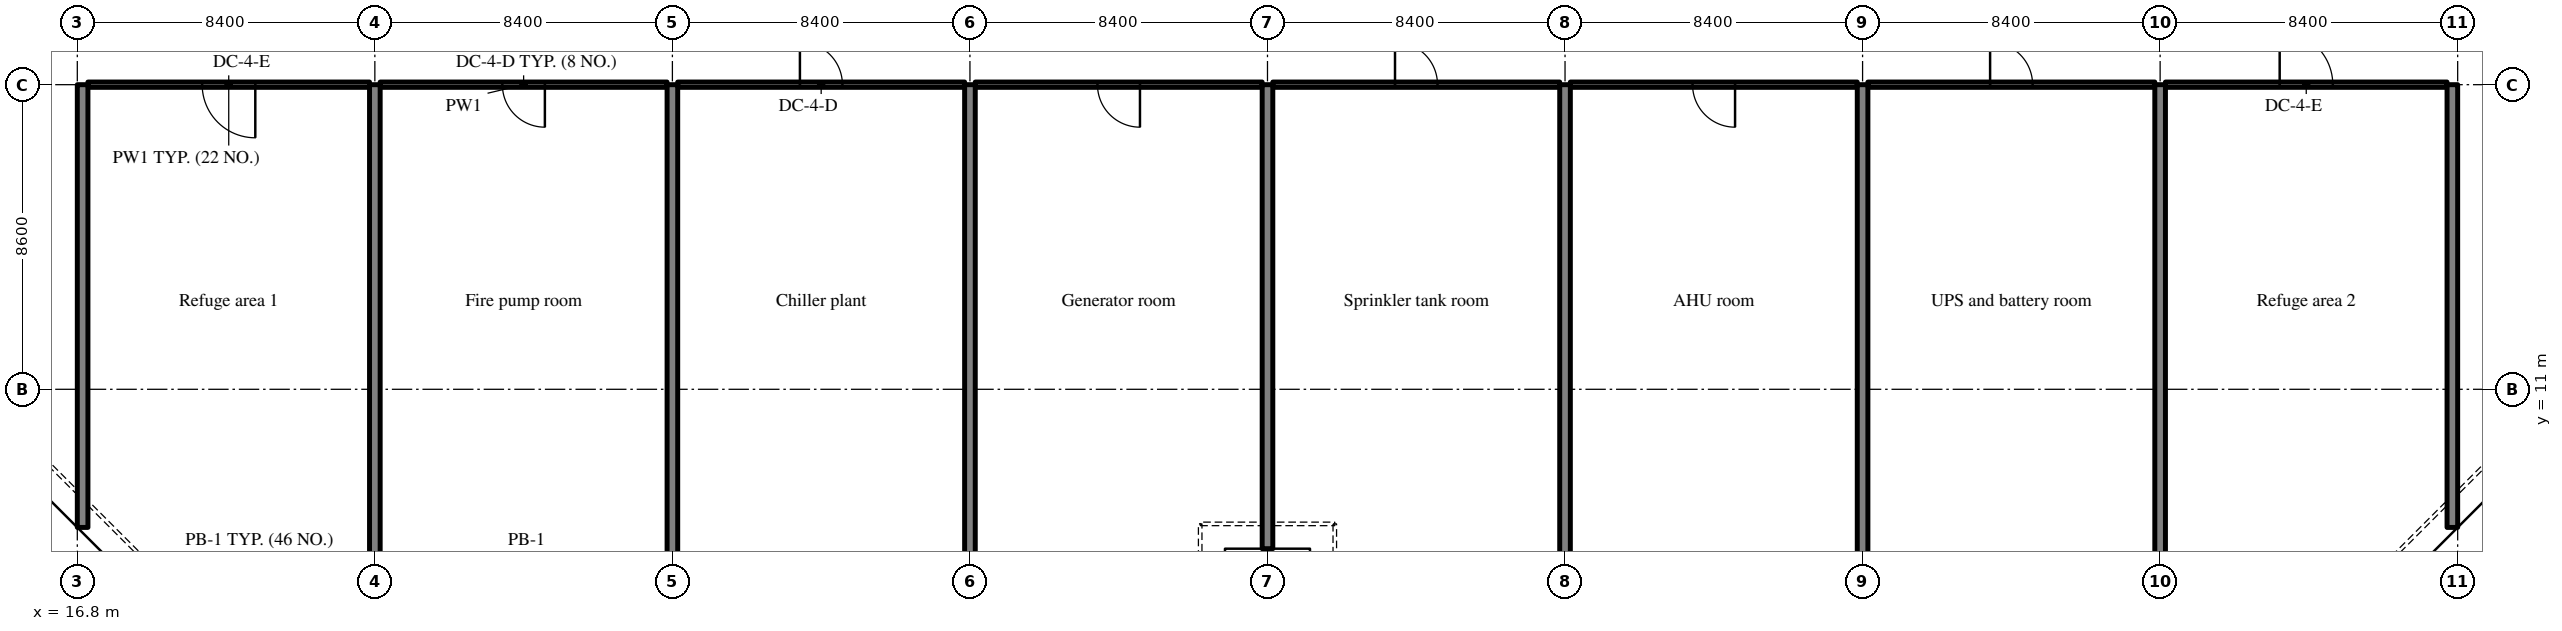
"""IFC4 building model, lengths in metres.
Left out: names, types, materials, properties, quantities, classifications, styles, units other than length and angle.
Written with IfcOpenShell. Run it as: python <this file> out.ifc"""

import sys

from ifc_helpers import new_model, si_unit, direction, frame, frame_2d, origin, place, context, subcontext, project, spatial, rectangle, extrude, source, transform, mapped, element, fill, save


model = new_model("IFC4")
c1 = context("Model", 3, precision=1e-05, world=origin(), true_north=direction((0.0, 1.0)))
c2 = subcontext(c1, "Body", "Model", "MODEL_VIEW")
j1 = project(units=[si_unit("LENGTHUNIT", "METRE"), si_unit("PLANEANGLEUNIT", "RADIAN")], contexts=[c1])
p1 = place(None, origin())
s1 = spatial("IfcSite", under=j1, at=p1, CompositionType="ELEMENT")
p2 = place(p1, origin())
s2 = spatial("IfcBuilding", under=s1, at=p2, CompositionType="ELEMENT")
p3 = place(p2, frame((0.0, 0.0, 264.7)))
s3 = spatial("IfcBuildingStorey", under=s2, at=p3, CompositionType="ELEMENT", Elevation=264.7)
m1 = source(origin(), c2, "Body", "SweptSolid", [
    extrude(rectangle(XDim=12.5, YDim=0.3, at=frame_2d((6.25, 0.0))), origin(), (0.0, 0.0, 1.0), 5.12),
])
p4 = place(p3, frame((16.95, 7.1, 0.0), z_axis=(0.0, 0.0, 1.0), x_axis=(0.0, 1.0, 0.0)))
e1 = element("IfcWall", 1, at=p4, inside=s3, PredefinedType="SHEAR", context=c2, shape_type="MappedRepresentation", body=[
    mapped(m1, transform((0.0, 0.0, 0.0), scale=1.0)),
])
m2 = source(origin(), c2, "Body", "SweptSolid", [
    extrude(rectangle(XDim=14.1, YDim=0.3, at=frame_2d((7.05, 0.0))), origin(), (0.0, 0.0, 1.0), 5.12),
])
for number, where, z_axis, x_axis in (
    (2, (25.2, 5.5, 0.0), (0.0, 0.0, 1.0), (0.0, 1.0, 0.0)),
    (3, (33.6, 5.5, 0.0), (0.0, 0.0, 1.0), (0.0, 1.0, 0.0)),
    (4, (42.0, 5.5, 0.0), (0.0, 0.0, 1.0), (0.0, 1.0, 0.0)),
):
    element("IfcWall", number, at=place(p3, frame(where, z_axis=z_axis, x_axis=x_axis)), inside=s3, PredefinedType="SHEAR", context=c2, shape_type="MappedRepresentation", body=[
        mapped(m2, transform((0.0, 0.0, 0.0), scale=1.0)),
    ])
m3 = source(origin(), c2, "Body", "SweptSolid", [
    extrude(rectangle(XDim=13.1, YDim=0.3, at=frame_2d((6.55, 0.0))), origin(), (0.0, 0.0, 1.0), 5.12),
])
p5 = place(p3, frame((50.4, 6.5, 0.0), z_axis=(0.0, 0.0, 1.0), x_axis=(0.0, 1.0, 0.0)))
e5 = element("IfcWall", 5, at=p5, inside=s3, PredefinedType="SHEAR", context=c2, shape_type="MappedRepresentation", body=[
    mapped(m3, transform((0.0, 0.0, 0.0), scale=1.0)),
])
for number, where, z_axis, x_axis in (
    (6, (58.8, 5.5, 0.0), (0.0, 0.0, 1.0), (0.0, 1.0, 0.0)),
    (7, (67.2, 5.5, 0.0), (0.0, 0.0, 1.0), (0.0, 1.0, 0.0)),
    (8, (75.6, 5.5, 0.0), (0.0, 0.0, 1.0), (0.0, 1.0, 0.0)),
):
    element("IfcWall", number, at=place(p3, frame(where, z_axis=z_axis, x_axis=x_axis)), inside=s3, PredefinedType="SHEAR", context=c2, shape_type="MappedRepresentation", body=[
        mapped(m2, transform((0.0, 0.0, 0.0), scale=1.0)),
    ])
p6 = place(p3, frame((83.85, 7.1, 0.0), z_axis=(0.0, 0.0, 1.0), x_axis=(0.0, 1.0, 0.0)))
e9 = element("IfcWall", 9, at=p6, inside=s3, PredefinedType="SHEAR", context=c2, shape_type="MappedRepresentation", body=[
    mapped(m1, transform((0.0, 0.0, 0.0), scale=1.0)),
])
m4 = source(origin(), c2, "Body", "SweptSolid", [
    extrude(rectangle(XDim=7.95, YDim=0.15, at=frame_2d((3.975, 0.0))), origin(), (0.0, 0.0, 1.0), 4.37),
])
p7 = place(p3, frame((17.1, 19.6, 0.0), z_axis=(0.0, 0.0, 1.0), x_axis=(1.0, 0.0, 0.0)))
e10 = element("IfcWall", 10, at=p7, inside=s3, PredefinedType="PARTITIONING", context=c2, shape_type="MappedRepresentation", body=[
    mapped(m4, transform((0.0, 0.0, 0.0), scale=1.0)),
])
m5 = source(origin(), c2, "Body", "SweptSolid", [
    extrude(rectangle(XDim=1.5, YDim=2.1, at=frame_2d((0.75, 1.05))), frame((0.0, 0.085, 0.0), z_axis=(0.0, -1.0, 0.0), x_axis=(1.0, 0.0, 0.0)), (0.0, 0.0, 1.0), 0.17),
])
p8 = place(p7, frame((3.225, 0.0, 0.0)))
e11 = element("IfcOpeningElement", 11, at=p8, cuts=e10, PredefinedType="OPENING", context=c2, shape_type="MappedRepresentation", body=[
    mapped(m5, transform((0.0, 0.0, 0.0), scale=1.0)),
])
m6 = source(origin(), c2, "Body", "SweptSolid", [
    extrude(rectangle(XDim=8.1, YDim=0.15, at=frame_2d((4.05, 0.0))), origin(), (0.0, 0.0, 1.0), 4.37),
])
p9 = place(p3, frame((25.35, 19.6, 0.0), z_axis=(0.0, 0.0, 1.0), x_axis=(1.0, 0.0, 0.0)))
e12 = element("IfcWall", 12, at=p9, inside=s3, PredefinedType="PARTITIONING", context=c2, shape_type="MappedRepresentation", body=[
    mapped(m6, transform((0.0, 0.0, 0.0), scale=1.0)),
])
m7 = source(origin(), c2, "Body", "SweptSolid", [
    extrude(rectangle(XDim=1.2, YDim=2.1, at=frame_2d((0.6, 1.05))), frame((0.0, 0.085, 0.0), z_axis=(0.0, -1.0, 0.0), x_axis=(1.0, 0.0, 0.0)), (0.0, 0.0, 1.0), 0.17),
])
p10 = place(p9, frame((3.45, 0.0, 0.0)))
e13 = element("IfcOpeningElement", 13, at=p10, cuts=e12, PredefinedType="OPENING", context=c2, shape_type="MappedRepresentation", body=[
    mapped(m7, transform((0.0, 0.0, 0.0), scale=1.0)),
])
m8 = source(origin(), c2, "Body", "SweptSolid", [
    extrude(rectangle(XDim=8.1, YDim=0.15, at=frame_2d((4.05, 0.0))), origin(), (0.0, 0.0, 1.0), 4.37),
])
p11 = place(p3, frame((33.75, 19.6, 0.0), z_axis=(0.0, 0.0, 1.0), x_axis=(1.0, 0.0, 0.0)))
e14 = element("IfcWall", 14, at=p11, inside=s3, PredefinedType="PARTITIONING", context=c2, shape_type="MappedRepresentation", body=[
    mapped(m8, transform((0.0, 0.0, 0.0), scale=1.0)),
])
p12 = place(p11, frame((3.45, 0.0, 0.0)))
e15 = element("IfcOpeningElement", 15, at=p12, cuts=e14, PredefinedType="OPENING", context=c2, shape_type="MappedRepresentation", body=[
    mapped(m7, transform((0.0, 0.0, 0.0), scale=1.0)),
])
p13 = place(p3, frame((42.15, 19.6, 0.0), z_axis=(0.0, 0.0, 1.0), x_axis=(1.0, 0.0, 0.0)))
e16 = element("IfcWall", 16, at=p13, inside=s3, PredefinedType="PARTITIONING", context=c2, shape_type="MappedRepresentation", body=[
    mapped(m8, transform((0.0, 0.0, 0.0), scale=1.0)),
])
p14 = place(p13, frame((3.45, 0.0, 0.0)))
e17 = element("IfcOpeningElement", 17, at=p14, cuts=e16, PredefinedType="OPENING", context=c2, shape_type="MappedRepresentation", body=[
    mapped(m7, transform((0.0, 0.0, 0.0), scale=1.0)),
])
p15 = place(p3, frame((50.55, 19.6, 0.0), z_axis=(0.0, 0.0, 1.0), x_axis=(1.0, 0.0, 0.0)))
e18 = element("IfcWall", 18, at=p15, inside=s3, PredefinedType="PARTITIONING", context=c2, shape_type="MappedRepresentation", body=[
    mapped(m6, transform((0.0, 0.0, 0.0), scale=1.0)),
])
p16 = place(p15, frame((3.45, 0.0, 0.0)))
e19 = element("IfcOpeningElement", 19, at=p16, cuts=e18, PredefinedType="OPENING", context=c2, shape_type="MappedRepresentation", body=[
    mapped(m7, transform((0.0, 0.0, 0.0), scale=1.0)),
])
p17 = place(p3, frame((58.95, 19.6, 0.0), z_axis=(0.0, 0.0, 1.0), x_axis=(1.0, 0.0, 0.0)))
e20 = element("IfcWall", 20, at=p17, inside=s3, PredefinedType="PARTITIONING", context=c2, shape_type="MappedRepresentation", body=[
    mapped(m8, transform((0.0, 0.0, 0.0), scale=1.0)),
])
p18 = place(p17, frame((3.45, 0.0, 0.0)))
e21 = element("IfcOpeningElement", 21, at=p18, cuts=e20, PredefinedType="OPENING", context=c2, shape_type="MappedRepresentation", body=[
    mapped(m7, transform((0.0, 0.0, 0.0), scale=1.0)),
])
p19 = place(p3, frame((67.35, 19.6, 0.0), z_axis=(0.0, 0.0, 1.0), x_axis=(1.0, 0.0, 0.0)))
e22 = element("IfcWall", 22, at=p19, inside=s3, PredefinedType="PARTITIONING", context=c2, shape_type="MappedRepresentation", body=[
    mapped(m6, transform((0.0, 0.0, 0.0), scale=1.0)),
])
p20 = place(p19, frame((3.45, 0.0, 0.0)))
e23 = element("IfcOpeningElement", 23, at=p20, cuts=e22, PredefinedType="OPENING", context=c2, shape_type="MappedRepresentation", body=[
    mapped(m7, transform((0.0, 0.0, 0.0), scale=1.0)),
])
p21 = place(p3, frame((75.75, 19.6, 0.0), z_axis=(0.0, 0.0, 1.0), x_axis=(1.0, 0.0, 0.0)))
e24 = element("IfcWall", 24, at=p21, inside=s3, PredefinedType="PARTITIONING", context=c2, shape_type="MappedRepresentation", body=[
    mapped(m4, transform((0.0, 0.0, 0.0), scale=1.0)),
])
p22 = place(p21, frame((3.225, 0.0, 0.0)))
e25 = element("IfcOpeningElement", 25, at=p22, cuts=e24, PredefinedType="OPENING", context=c2, shape_type="MappedRepresentation", body=[
    mapped(m5, transform((0.0, 0.0, 0.0), scale=1.0)),
])
m9 = source(origin(), c2, "Body", "SweptSolid", [
    extrude(rectangle(XDim=1.5, YDim=2.1, at=frame_2d((0.75, 1.05))), frame((0.0, 0.025, 0.0), z_axis=(0.0, -1.0, 0.0), x_axis=(1.0, 0.0, 0.0)), (0.0, 0.0, 1.0), 0.05),
])
p23 = place(p8, origin())
e26 = element("IfcDoor", 26, at=p23, inside=s3, OperationType="SINGLE_SWING_RIGHT", PredefinedType="DOOR", context=c2, shape_type="MappedRepresentation", body=[
    mapped(m9, transform((0.0, 0.0, 0.0), scale=1.0)),
])
fill(e11, e26)
m10 = source(origin(), c2, "Body", "SweptSolid", [
    extrude(rectangle(XDim=1.2, YDim=2.1, at=frame_2d((0.6, 1.05))), frame((0.0, 0.025, 0.0), z_axis=(0.0, -1.0, 0.0), x_axis=(1.0, 0.0, 0.0)), (0.0, 0.0, 1.0), 0.05),
])
p24 = place(p10, origin())
e27 = element("IfcDoor", 27, at=p24, inside=s3, OperationType="SINGLE_SWING_RIGHT", PredefinedType="DOOR", context=c2, shape_type="MappedRepresentation", body=[
    mapped(m10, transform((0.0, 0.0, 0.0), scale=1.0)),
])
fill(e13, e27)
p25 = place(p12, origin())
e28 = element("IfcDoor", 28, at=p25, inside=s3, OperationType="SINGLE_SWING_LEFT", PredefinedType="DOOR", context=c2, shape_type="MappedRepresentation", body=[
    mapped(m10, transform((0.0, 0.0, 0.0), scale=1.0)),
])
fill(e15, e28)
p26 = place(p14, origin())
e29 = element("IfcDoor", 29, at=p26, inside=s3, OperationType="SINGLE_SWING_RIGHT", PredefinedType="DOOR", context=c2, shape_type="MappedRepresentation", body=[
    mapped(m10, transform((0.0, 0.0, 0.0), scale=1.0)),
])
fill(e17, e29)
p27 = place(p16, origin())
e30 = element("IfcDoor", 30, at=p27, inside=s3, OperationType="SINGLE_SWING_LEFT", PredefinedType="DOOR", context=c2, shape_type="MappedRepresentation", body=[
    mapped(m10, transform((0.0, 0.0, 0.0), scale=1.0)),
])
fill(e19, e30)
p28 = place(p18, origin())
e31 = element("IfcDoor", 31, at=p28, inside=s3, OperationType="SINGLE_SWING_RIGHT", PredefinedType="DOOR", context=c2, shape_type="MappedRepresentation", body=[
    mapped(m10, transform((0.0, 0.0, 0.0), scale=1.0)),
])
fill(e21, e31)
p29 = place(p20, origin())
e32 = element("IfcDoor", 32, at=p29, inside=s3, OperationType="SINGLE_SWING_LEFT", PredefinedType="DOOR", context=c2, shape_type="MappedRepresentation", body=[
    mapped(m10, transform((0.0, 0.0, 0.0), scale=1.0)),
])
fill(e23, e32)
p30 = place(p22, origin())
e33 = element("IfcDoor", 33, at=p30, inside=s3, OperationType="SINGLE_SWING_LEFT", PredefinedType="DOOR", context=c2, shape_type="MappedRepresentation", body=[
    mapped(m9, transform((0.0, 0.0, 0.0), scale=1.0)),
])
fill(e25, e33)
save(model, sys.argv[1])
